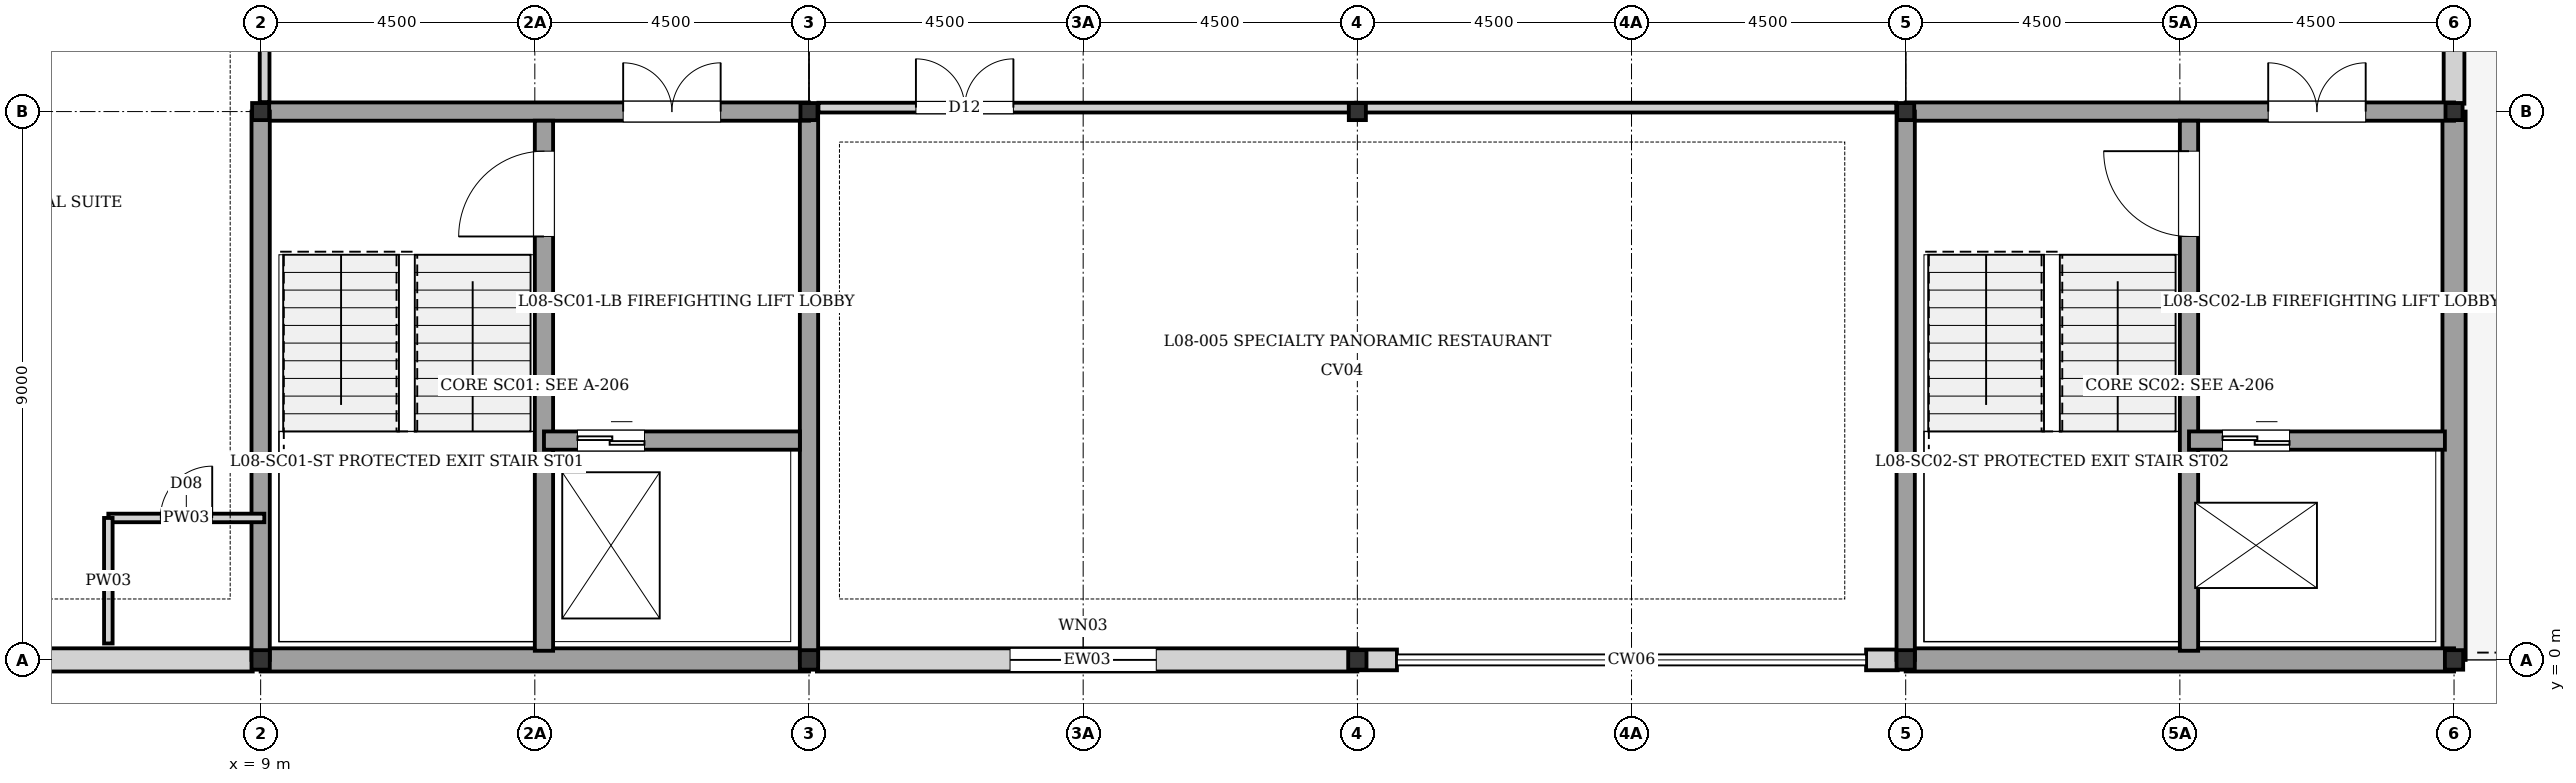
"""IFC4 building model, lengths in metres.
Left out: names, types, materials, properties, quantities, classifications, styles, units other than length and angle.
Written with IfcOpenShell. Run it as: python <this file> out.ifc"""

import sys

from ifc_helpers import new_model, si_unit, direction, frame, frame_2d, origin, origin_2d, place, context, subcontext, project, spatial, rectangle, i_section, extrude, element, fill, save


model = new_model("IFC4")
c1 = context("Model", 3, precision=1e-05, world=origin(), true_north=direction((0.0, 1.0)))
c2 = subcontext(c1, "Body", "Model", "MODEL_VIEW")
j1 = project(units=[si_unit("LENGTHUNIT", "METRE"), si_unit("PLANEANGLEUNIT", "RADIAN")], contexts=[c1])
p1 = place(None, origin())
s1 = spatial("IfcSite", under=j1, at=p1, CompositionType="ELEMENT")
p2 = place(p1, origin())
s2 = spatial("IfcBuilding", under=s1, at=p2, CompositionType="ELEMENT")
p3 = place(p2, frame((0.0, 0.0, 26.88)))
s3 = spatial("IfcBuildingStorey", under=s2, at=p3, CompositionType="ELEMENT", Elevation=26.88)
p4 = place(p3, frame((9.0, 0.0, 0.0), z_axis=(0.0, 0.0, 1.0), x_axis=(1.0, 0.0, 0.0)))
e1 = element("IfcColumn", 1, at=p4, inside=s3, PredefinedType="COLUMN", context=c2, shape_type="SweptSolid", body=[
    extrude(i_section(OverallWidth=0.3, OverallDepth=0.32, WebThickness=0.011, FlangeThickness=0.021, at=origin_2d()), origin(), (0.0, 0.0, 1.0), 3.52),
])
p5 = place(p3, frame((9.0, 9.0, 0.0), z_axis=(0.0, 0.0, 1.0), x_axis=(1.0, 0.0, 0.0)))
e2 = element("IfcColumn", 2, at=p5, inside=s3, PredefinedType="COLUMN", context=c2, shape_type="SweptSolid", body=[
    extrude(i_section(OverallWidth=0.28, OverallDepth=0.28, WebThickness=0.01, FlangeThickness=0.018, at=origin_2d()), origin(), (0.0, 0.0, 1.0), 3.52),
])
p6 = place(p3, frame((18.0, 0.0, 0.0), z_axis=(0.0, 0.0, 1.0), x_axis=(1.0, 0.0, 0.0)))
e3 = element("IfcColumn", 3, at=p6, inside=s3, PredefinedType="COLUMN", context=c2, shape_type="SweptSolid", body=[
    extrude(i_section(OverallWidth=0.3, OverallDepth=0.32, WebThickness=0.011, FlangeThickness=0.021, at=origin_2d()), origin(), (0.0, 0.0, 1.0), 3.52),
])
p7 = place(p3, frame((18.0, 9.0, 0.0), z_axis=(0.0, 0.0, 1.0), x_axis=(1.0, 0.0, 0.0)))
e4 = element("IfcColumn", 4, at=p7, inside=s3, PredefinedType="COLUMN", context=c2, shape_type="SweptSolid", body=[
    extrude(i_section(OverallWidth=0.28, OverallDepth=0.28, WebThickness=0.01, FlangeThickness=0.018, at=origin_2d()), origin(), (0.0, 0.0, 1.0), 3.52),
])
p8 = place(p3, frame((27.0, 0.0, 0.0), z_axis=(0.0, 0.0, 1.0), x_axis=(1.0, 0.0, 0.0)))
e5 = element("IfcColumn", 5, at=p8, inside=s3, PredefinedType="COLUMN", context=c2, shape_type="SweptSolid", body=[
    extrude(i_section(OverallWidth=0.3, OverallDepth=0.32, WebThickness=0.011, FlangeThickness=0.021, at=origin_2d()), origin(), (0.0, 0.0, 1.0), 3.52),
])
p9 = place(p3, frame((27.0, 9.0, 0.0), z_axis=(0.0, 0.0, 1.0), x_axis=(1.0, 0.0, 0.0)))
e6 = element("IfcColumn", 6, at=p9, inside=s3, PredefinedType="COLUMN", context=c2, shape_type="SweptSolid", body=[
    extrude(i_section(OverallWidth=0.28, OverallDepth=0.28, WebThickness=0.01, FlangeThickness=0.018, at=origin_2d()), origin(), (0.0, 0.0, 1.0), 3.52),
])
p10 = place(p3, frame((36.0, 0.0, 0.0), z_axis=(0.0, 0.0, 1.0), x_axis=(1.0, 0.0, 0.0)))
e7 = element("IfcColumn", 7, at=p10, inside=s3, PredefinedType="COLUMN", context=c2, shape_type="SweptSolid", body=[
    extrude(i_section(OverallWidth=0.3, OverallDepth=0.32, WebThickness=0.011, FlangeThickness=0.021, at=origin_2d()), origin(), (0.0, 0.0, 1.0), 3.52),
])
p11 = place(p3, frame((36.0, 9.0, 0.0), z_axis=(0.0, 0.0, 1.0), x_axis=(1.0, 0.0, 0.0)))
e8 = element("IfcColumn", 8, at=p11, inside=s3, PredefinedType="COLUMN", context=c2, shape_type="SweptSolid", body=[
    extrude(i_section(OverallWidth=0.28, OverallDepth=0.28, WebThickness=0.01, FlangeThickness=0.018, at=origin_2d()), origin(), (0.0, 0.0, 1.0), 3.52),
])
p12 = place(p3, frame((45.0, 0.0, 0.0), z_axis=(0.0, 0.0, 1.0), x_axis=(1.0, 0.0, 0.0)))
e9 = element("IfcColumn", 9, at=p12, inside=s3, PredefinedType="COLUMN", context=c2, shape_type="SweptSolid", body=[
    extrude(i_section(OverallWidth=0.3, OverallDepth=0.32, WebThickness=0.011, FlangeThickness=0.021, at=origin_2d()), origin(), (0.0, 0.0, 1.0), 3.52),
])
p13 = place(p3, frame((45.0, 9.0, 0.0), z_axis=(0.0, 0.0, 1.0), x_axis=(1.0, 0.0, 0.0)))
e10 = element("IfcColumn", 10, at=p13, inside=s3, PredefinedType="COLUMN", context=c2, shape_type="SweptSolid", body=[
    extrude(i_section(OverallWidth=0.28, OverallDepth=0.28, WebThickness=0.01, FlangeThickness=0.018, at=origin_2d()), origin(), (0.0, 0.0, 1.0), 3.52),
])
p14 = place(p3, frame((45.0, 17.845, 0.0), z_axis=(0.0, 0.0, 1.0), x_axis=(0.0, -1.0, 0.0)))
e11 = element("IfcWall", 11, at=p14, inside=s3, PredefinedType="SOLIDWALL", context=c2, shape_type="SweptSolid", body=[
    extrude(rectangle(XDim=8.715, YDim=0.34, at=frame_2d((4.357, 0.0))), origin(), (0.0, 0.0, 1.0), 2.88),
])
p15 = place(p14, frame((3.445, 0.0, 0.0)))
e12 = element("IfcOpeningElement", 12, at=p15, cuts=e11, PredefinedType="OPENING", context=c2, shape_type="SweptSolid", body=[
    extrude(rectangle(XDim=1.8, YDim=2.3, at=frame_2d((0.9, 1.15))), frame((0.0, 0.18, 0.0), z_axis=(0.0, -1.0, 0.0), x_axis=(1.0, 0.0, 0.0)), (0.0, 0.0, 1.0), 0.36),
])
for number, where, z_axis, x_axis in (
    (13, (45.0, 9.0, 0.0), (0.0, 0.0, 1.0), (0.0, -1.0, 0.0)),
    (14, (45.0, 0.0, 0.0), (0.0, 0.0, 1.0), (-1.0, 0.0, 0.0)),
):
    element("IfcWall", number, at=place(p3, frame(where, z_axis=z_axis, x_axis=x_axis)), inside=s3, PredefinedType="SOLIDWALL", context=c2, shape_type="SweptSolid", body=[
        extrude(rectangle(XDim=9.0, YDim=0.38, at=frame_2d((4.5, 0.0))), origin(), (0.0, 0.0, 1.0), 3.27),
    ])
p16 = place(p3, frame((35.87, 0.0, 0.0), z_axis=(0.0, 0.0, 1.0), x_axis=(-1.0, 0.0, 0.0)))
e15 = element("IfcWall", 15, at=p16, inside=s3, PredefinedType="SOLIDWALL", context=c2, shape_type="SweptSolid", body=[
    extrude(rectangle(XDim=0.52, YDim=0.34, at=frame_2d((0.26, 0.0))), origin(), (0.0, 0.0, 1.0), 3.27),
])
p17 = place(p3, frame((27.65, 0.0, 0.0), z_axis=(0.0, 0.0, 1.0), x_axis=(-1.0, 0.0, 0.0)))
e16 = element("IfcWall", 16, at=p17, inside=s3, PredefinedType="SOLIDWALL", context=c2, shape_type="SweptSolid", body=[
    extrude(rectangle(XDim=0.65, YDim=0.34, at=frame_2d((0.325, 0.0))), origin(), (0.0, 0.0, 1.0), 3.27),
])
p18 = place(p3, frame((27.0, 0.0, 0.0), z_axis=(0.0, 0.0, 1.0), x_axis=(-1.0, 0.0, 0.0)))
e17 = element("IfcWall", 17, at=p18, inside=s3, PredefinedType="SOLIDWALL", context=c2, shape_type="SweptSolid", body=[
    extrude(rectangle(XDim=8.87, YDim=0.38, at=frame_2d((4.435, 0.0))), origin(), (0.0, 0.0, 1.0), 3.04),
])
p19 = place(p18, frame((3.3, 0.0, 0.4)))
e18 = element("IfcOpeningElement", 18, at=p19, cuts=e17, PredefinedType="OPENING", context=c2, shape_type="SweptSolid", body=[
    extrude(rectangle(XDim=2.4, YDim=1.95, at=frame_2d((1.2, 0.975))), frame((0.0, 0.2, 0.0), z_axis=(0.0, -1.0, 0.0), x_axis=(1.0, 0.0, 0.0)), (0.0, 0.0, 1.0), 0.4),
])
p20 = place(p3, frame((18.0, 0.0, 0.0), z_axis=(0.0, 0.0, 1.0), x_axis=(-1.0, 0.0, 0.0)))
e19 = element("IfcWall", 19, at=p20, inside=s3, PredefinedType="SOLIDWALL", context=c2, shape_type="SweptSolid", body=[
    extrude(rectangle(XDim=9.0, YDim=0.38, at=frame_2d((4.5, 0.0))), origin(), (0.0, 0.0, 1.0), 3.27),
])
p21 = place(p3, frame((8.87, 0.0, 0.0), z_axis=(0.0, 0.0, 1.0), x_axis=(-1.0, 0.0, 0.0)))
e20 = element("IfcWall", 20, at=p21, inside=s3, PredefinedType="SOLIDWALL", context=c2, shape_type="SweptSolid", body=[
    extrude(rectangle(XDim=8.87, YDim=0.38, at=frame_2d((4.435, 0.0))), origin(), (0.0, 0.0, 1.0), 3.27),
])
p22 = place(p21, frame((3.32, 0.0, 0.4)))
e21 = element("IfcOpeningElement", 21, at=p22, cuts=e20, PredefinedType="OPENING", context=c2, shape_type="SweptSolid", body=[
    extrude(rectangle(XDim=2.1, YDim=1.95, at=frame_2d((1.05, 0.975))), frame((0.0, 0.2, 0.0), z_axis=(0.0, -1.0, 0.0), x_axis=(1.0, 0.0, 0.0)), (0.0, 0.0, 1.0), 0.4),
])
p23 = place(p3, frame((18.0, 0.0, 0.0), z_axis=(0.0, 0.0, 1.0), x_axis=(0.0, 1.0, 0.0)))
e22 = element("IfcWall", 22, at=p23, inside=s3, PredefinedType="SHEAR", context=c2, shape_type="SweptSolid", body=[
    extrude(rectangle(XDim=9.0, YDim=0.3, at=frame_2d((4.5, 0.0))), origin(), (0.0, 0.0, 1.0), 3.27),
])
p24 = place(p3, frame((9.0, 9.0, 0.0), z_axis=(0.0, 0.0, 1.0), x_axis=(1.0, 0.0, 0.0)))
e23 = element("IfcWall", 23, at=p24, inside=s3, PredefinedType="SHEAR", context=c2, shape_type="SweptSolid", body=[
    extrude(rectangle(XDim=9.0, YDim=0.3, at=frame_2d((4.5, 0.0))), origin(), (0.0, 0.0, 1.0), 3.27),
])
p25 = place(p24, frame((5.95, 0.0, 0.0)))
e24 = element("IfcOpeningElement", 24, at=p25, cuts=e23, PredefinedType="OPENING", context=c2, shape_type="SweptSolid", body=[
    extrude(rectangle(XDim=1.6, YDim=2.1, at=frame_2d((0.8, 1.05))), frame((0.0, 0.16, 0.0), z_axis=(0.0, -1.0, 0.0), x_axis=(1.0, 0.0, 0.0)), (0.0, 0.0, 1.0), 0.32),
])
p26 = place(p3, frame((9.0, 0.0, 0.0), z_axis=(0.0, 0.0, 1.0), x_axis=(0.0, 1.0, 0.0)))
e25 = element("IfcWall", 25, at=p26, inside=s3, PredefinedType="SHEAR", context=c2, shape_type="SweptSolid", body=[
    extrude(rectangle(XDim=9.0, YDim=0.3, at=frame_2d((4.5, 0.0))), origin(), (0.0, 0.0, 1.0), 3.27),
])
p27 = place(p3, frame((13.65, 0.15, 0.0), z_axis=(0.0, 0.0, 1.0), x_axis=(0.0, 1.0, 0.0)))
e26 = element("IfcWall", 26, at=p27, inside=s3, PredefinedType="SHEAR", context=c2, shape_type="SweptSolid", body=[
    extrude(rectangle(XDim=8.7, YDim=0.3, at=frame_2d((4.35, 0.0))), origin(), (0.0, 0.0, 1.0), 3.27),
])
p28 = place(p27, frame((6.8, 0.0, 0.0)))
e27 = element("IfcOpeningElement", 27, at=p28, cuts=e26, PredefinedType="OPENING", context=c2, shape_type="SweptSolid", body=[
    extrude(rectangle(XDim=1.4, YDim=2.02, at=frame_2d((0.7, 1.01))), frame((0.0, 0.16, 0.0), z_axis=(0.0, -1.0, 0.0), x_axis=(1.0, 0.0, 0.0)), (0.0, 0.0, 1.0), 0.32),
])
p29 = place(p3, frame((13.65, 3.6, 0.0), z_axis=(0.0, 0.0, 1.0), x_axis=(1.0, 0.0, 0.0)))
e28 = element("IfcWall", 28, at=p29, inside=s3, PredefinedType="SHEAR", context=c2, shape_type="SweptSolid", body=[
    extrude(rectangle(XDim=4.2, YDim=0.3, at=frame_2d((2.1, 0.0))), origin(), (0.0, 0.0, 1.0), 3.27),
])
p30 = place(p29, frame((0.55, 0.0, 0.0)))
e29 = element("IfcOpeningElement", 29, at=p30, cuts=e28, PredefinedType="OPENING", context=c2, shape_type="SweptSolid", body=[
    extrude(rectangle(XDim=1.1, YDim=2.1, at=frame_2d((0.55, 1.05))), frame((0.0, 0.16, 0.0), z_axis=(0.0, -1.0, 0.0), x_axis=(1.0, 0.0, 0.0)), (0.0, 0.0, 1.0), 0.32),
])
p31 = place(p3, frame((36.0, 9.0, 0.0), z_axis=(0.0, 0.0, 1.0), x_axis=(1.0, 0.0, 0.0)))
e30 = element("IfcWall", 30, at=p31, inside=s3, PredefinedType="SHEAR", context=c2, shape_type="SweptSolid", body=[
    extrude(rectangle(XDim=9.0, YDim=0.3, at=frame_2d((4.5, 0.0))), origin(), (0.0, 0.0, 1.0), 3.27),
])
p32 = place(p31, frame((5.95, 0.0, 0.0)))
e31 = element("IfcOpeningElement", 31, at=p32, cuts=e30, PredefinedType="OPENING", context=c2, shape_type="SweptSolid", body=[
    extrude(rectangle(XDim=1.6, YDim=2.1, at=frame_2d((0.8, 1.05))), frame((0.0, 0.16, 0.0), z_axis=(0.0, -1.0, 0.0), x_axis=(1.0, 0.0, 0.0)), (0.0, 0.0, 1.0), 0.32),
])
p33 = place(p3, frame((36.0, 0.0, 0.0), z_axis=(0.0, 0.0, 1.0), x_axis=(0.0, 1.0, 0.0)))
e32 = element("IfcWall", 32, at=p33, inside=s3, PredefinedType="SHEAR", context=c2, shape_type="SweptSolid", body=[
    extrude(rectangle(XDim=9.0, YDim=0.3, at=frame_2d((4.5, 0.0))), origin(), (0.0, 0.0, 1.0), 3.27),
])
p34 = place(p3, frame((40.65, 0.15, 0.0), z_axis=(0.0, 0.0, 1.0), x_axis=(0.0, 1.0, 0.0)))
e33 = element("IfcWall", 33, at=p34, inside=s3, PredefinedType="SHEAR", context=c2, shape_type="SweptSolid", body=[
    extrude(rectangle(XDim=8.7, YDim=0.3, at=frame_2d((4.35, 0.0))), origin(), (0.0, 0.0, 1.0), 3.27),
])
p35 = place(p34, frame((6.8, 0.0, 0.0)))
e34 = element("IfcOpeningElement", 34, at=p35, cuts=e33, PredefinedType="OPENING", context=c2, shape_type="SweptSolid", body=[
    extrude(rectangle(XDim=1.4, YDim=2.02, at=frame_2d((0.7, 1.01))), frame((0.0, 0.16, 0.0), z_axis=(0.0, -1.0, 0.0), x_axis=(1.0, 0.0, 0.0)), (0.0, 0.0, 1.0), 0.32),
])
p36 = place(p3, frame((40.65, 3.6, 0.0), z_axis=(0.0, 0.0, 1.0), x_axis=(1.0, 0.0, 0.0)))
e35 = element("IfcWall", 35, at=p36, inside=s3, PredefinedType="SHEAR", context=c2, shape_type="SweptSolid", body=[
    extrude(rectangle(XDim=4.2, YDim=0.3, at=frame_2d((2.1, 0.0))), origin(), (0.0, 0.0, 1.0), 3.27),
])
p37 = place(p36, frame((0.55, 0.0, 0.0)))
e36 = element("IfcOpeningElement", 36, at=p37, cuts=e35, PredefinedType="OPENING", context=c2, shape_type="SweptSolid", body=[
    extrude(rectangle(XDim=1.1, YDim=2.1, at=frame_2d((0.55, 1.05))), frame((0.0, 0.16, 0.0), z_axis=(0.0, -1.0, 0.0), x_axis=(1.0, 0.0, 0.0)), (0.0, 0.0, 1.0), 0.32),
])
p38 = place(p3, frame((6.5, 2.33, 0.0), z_axis=(0.0, 0.0, 1.0), x_axis=(1.0, 0.0, 0.0)))
e37 = element("IfcWall", 37, at=p38, inside=s3, PredefinedType="PLUMBINGWALL", context=c2, shape_type="SweptSolid", body=[
    extrude(rectangle(XDim=2.56, YDim=0.14, at=frame_2d((1.28, 0.0))), origin(), (0.0, 0.0, 1.0), 3.27),
])
p39 = place(p38, frame((0.855, 0.0, 0.0)))
e38 = element("IfcOpeningElement", 38, at=p39, cuts=e37, PredefinedType="OPENING", context=c2, shape_type="SweptSolid", body=[
    extrude(rectangle(XDim=0.85, YDim=2.04, at=frame_2d((0.425, 1.02))), frame((0.0, 0.08, 0.0), z_axis=(0.0, -1.0, 0.0), x_axis=(1.0, 0.0, 0.0)), (0.0, 0.0, 1.0), 0.16),
])
p40 = place(p3, frame((6.5, 0.27, 0.0), z_axis=(0.0, 0.0, 1.0), x_axis=(0.0, 1.0, 0.0)))
e39 = element("IfcWall", 39, at=p40, inside=s3, PredefinedType="PLUMBINGWALL", context=c2, shape_type="SweptSolid", body=[
    extrude(rectangle(XDim=2.06, YDim=0.14, at=frame_2d((1.03, 0.0))), origin(), (0.0, 0.0, 1.0), 3.27),
])
p41 = place(p3, frame((9.065, 9.155, 0.0), z_axis=(0.0, 0.0, 1.0), x_axis=(0.0, 1.0, 0.0)))
e40 = element("IfcWall", 40, at=p41, inside=s3, PredefinedType="PARTITIONING", context=c2, shape_type="SweptSolid", body=[
    extrude(rectangle(XDim=2.475, YDim=0.16, at=frame_2d((1.237, 0.0))), origin(), (0.0, 0.0, 1.0), 3.27),
])
p42 = place(p3, frame((18.155, 9.065, 0.0), z_axis=(0.0, 0.0, 1.0), x_axis=(1.0, 0.0, 0.0)))
e41 = element("IfcWall", 41, at=p42, inside=s3, PredefinedType="PARTITIONING", context=c2, shape_type="SweptSolid", body=[
    extrude(rectangle(XDim=8.825, YDim=0.16, at=frame_2d((4.413, 0.0))), origin(), (0.0, 0.0, 1.0), 2.87),
])
p43 = place(p42, frame((1.6, 0.0, 0.0)))
e42 = element("IfcOpeningElement", 42, at=p43, cuts=e41, PredefinedType="OPENING", context=c2, shape_type="SweptSolid", body=[
    extrude(rectangle(XDim=1.6, YDim=2.3, at=frame_2d((0.8, 1.15))), frame((0.0, 0.09, 0.0), z_axis=(0.0, -1.0, 0.0), x_axis=(1.0, 0.0, 0.0)), (0.0, 0.0, 1.0), 0.18),
])
p44 = place(p3, frame((26.98, 9.065, 0.0), z_axis=(0.0, 0.0, 1.0), x_axis=(1.0, 0.0, 0.0)))
e43 = element("IfcWall", 43, at=p44, inside=s3, PredefinedType="PARTITIONING", context=c2, shape_type="SweptSolid", body=[
    extrude(rectangle(XDim=8.865, YDim=0.16, at=frame_2d((4.433, 0.0))), origin(), (0.0, 0.0, 1.0), 3.27),
])
p45 = place(p19, origin())
e44 = element("IfcWindow", 44, at=p45, inside=s3, PartitioningType="SINGLE_PANEL", PredefinedType="WINDOW", context=c2, shape_type="SweptSolid", body=[
    extrude(rectangle(XDim=2.4, YDim=1.95, at=frame_2d((1.2, 0.975))), frame((0.0, 0.03, 0.0), z_axis=(0.0, -1.0, 0.0), x_axis=(1.0, 0.0, 0.0)), (0.0, 0.0, 1.0), 0.06),
])
fill(e18, e44)
p46 = place(p25, origin())
e45 = element("IfcDoor", 45, at=p46, inside=s3, OperationType="DOUBLE_DOOR_SINGLE_SWING", PredefinedType="DOOR", context=c2, shape_type="SweptSolid", body=[
    extrude(rectangle(XDim=1.6, YDim=2.1, at=frame_2d((0.8, 1.05))), frame((0.0, 0.025, 0.0), z_axis=(0.0, -1.0, 0.0), x_axis=(1.0, 0.0, 0.0)), (0.0, 0.0, 1.0), 0.05),
])
fill(e24, e45)
p47 = place(p28, origin())
e46 = element("IfcDoor", 46, at=p47, inside=s3, OperationType="SINGLE_SWING_LEFT", PredefinedType="DOOR", context=c2, shape_type="SweptSolid", body=[
    extrude(rectangle(XDim=1.4, YDim=2.02, at=frame_2d((0.7, 1.01))), frame((0.0, 0.025, 0.0), z_axis=(0.0, -1.0, 0.0), x_axis=(1.0, 0.0, 0.0)), (0.0, 0.0, 1.0), 0.05),
])
fill(e27, e46)
p48 = place(p30, origin())
e47 = element("IfcDoor", 47, at=p48, inside=s3, OperationType="DOUBLE_DOOR_SLIDING", PredefinedType="DOOR", context=c2, shape_type="SweptSolid", body=[
    extrude(rectangle(XDim=1.1, YDim=2.1, at=frame_2d((0.55, 1.05))), frame((0.0, 0.025, 0.0), z_axis=(0.0, -1.0, 0.0), x_axis=(1.0, 0.0, 0.0)), (0.0, 0.0, 1.0), 0.05),
])
fill(e29, e47)
p49 = place(p32, origin())
e48 = element("IfcDoor", 48, at=p49, inside=s3, OperationType="DOUBLE_DOOR_SINGLE_SWING", PredefinedType="DOOR", context=c2, shape_type="SweptSolid", body=[
    extrude(rectangle(XDim=1.6, YDim=2.1, at=frame_2d((0.8, 1.05))), frame((0.0, 0.025, 0.0), z_axis=(0.0, -1.0, 0.0), x_axis=(1.0, 0.0, 0.0)), (0.0, 0.0, 1.0), 0.05),
])
fill(e31, e48)
p50 = place(p35, origin())
e49 = element("IfcDoor", 49, at=p50, inside=s3, OperationType="SINGLE_SWING_RIGHT", PredefinedType="DOOR", context=c2, shape_type="SweptSolid", body=[
    extrude(rectangle(XDim=1.4, YDim=2.02, at=frame_2d((0.7, 1.01))), frame((0.0, 0.025, 0.0), z_axis=(0.0, -1.0, 0.0), x_axis=(1.0, 0.0, 0.0)), (0.0, 0.0, 1.0), 0.05),
])
fill(e34, e49)
p51 = place(p37, origin())
e50 = element("IfcDoor", 50, at=p51, inside=s3, OperationType="DOUBLE_DOOR_SLIDING", PredefinedType="DOOR", context=c2, shape_type="SweptSolid", body=[
    extrude(rectangle(XDim=1.1, YDim=2.1, at=frame_2d((0.55, 1.05))), frame((0.0, 0.025, 0.0), z_axis=(0.0, -1.0, 0.0), x_axis=(1.0, 0.0, 0.0)), (0.0, 0.0, 1.0), 0.05),
])
fill(e36, e50)
p52 = place(p39, origin())
e51 = element("IfcDoor", 51, at=p52, inside=s3, OperationType="SINGLE_SWING_RIGHT", PredefinedType="DOOR", context=c2, shape_type="SweptSolid", body=[
    extrude(rectangle(XDim=0.85, YDim=2.04, at=frame_2d((0.425, 1.02))), frame((0.0, 0.025, 0.0), z_axis=(0.0, -1.0, 0.0), x_axis=(1.0, 0.0, 0.0)), (0.0, 0.0, 1.0), 0.05),
])
fill(e38, e51)
p53 = place(p43, origin())
e52 = element("IfcDoor", 52, at=p53, inside=s3, OperationType="DOUBLE_DOOR_SINGLE_SWING", PredefinedType="DOOR", context=c2, shape_type="SweptSolid", body=[
    extrude(rectangle(XDim=1.6, YDim=2.3, at=frame_2d((0.8, 1.15))), frame((0.0, 0.025, 0.0), z_axis=(0.0, -1.0, 0.0), x_axis=(1.0, 0.0, 0.0)), (0.0, 0.0, 1.0), 0.05),
])
fill(e42, e52)
save(model, sys.argv[1])
